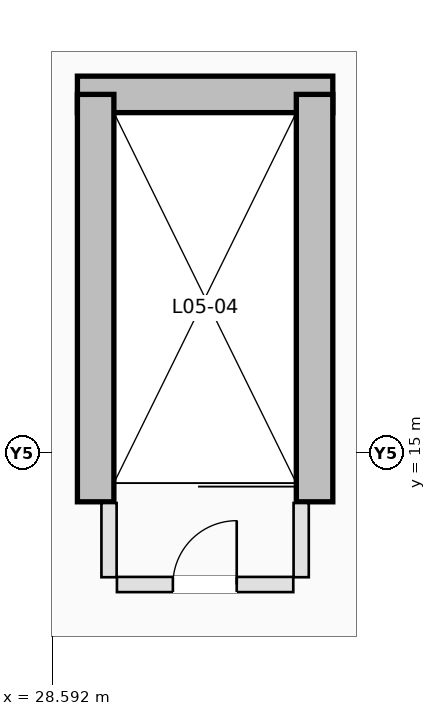
"""IFC4 building model, lengths in metres.
Left out: names, types, materials, properties, quantities, classifications, styles, units other than length and angle.
Written with IfcOpenShell. Run it as: python <this file> out.ifc"""

import sys

from ifc_helpers import new_model, si_unit, direction, frame, frame_2d, origin, place, context, subcontext, project, spatial, rectangle, extrude, element, fill, save


model = new_model("IFC4")
c1 = context("Model", 3, precision=1e-05, world=origin(), true_north=direction((0.0, 1.0)))
c2 = subcontext(c1, "Body", "Model", "MODEL_VIEW")
j1 = project(units=[si_unit("LENGTHUNIT", "METRE"), si_unit("PLANEANGLEUNIT", "RADIAN")], contexts=[c1])
p1 = place(None, origin())
s1 = spatial("IfcSite", under=j1, at=p1, CompositionType="ELEMENT")
p2 = place(p1, origin())
s2 = spatial("IfcBuilding", under=s1, at=p2, CompositionType="ELEMENT")
p3 = place(p2, frame((0.0, 0.0, 23.0)))
s3 = spatial("IfcBuildingStorey", under=s2, at=p3, CompositionType="ELEMENT", Elevation=23.0)
p4 = place(p3, frame((29.0, 20.9, 0.0), z_axis=(0.0, 0.0, 1.0), x_axis=(1.0, 0.0, 0.0)))
e1 = element("IfcWall", 1, at=p4, inside=s3, PredefinedType="SHEAR", context=c2, shape_type="SweptSolid", body=[
    extrude(rectangle(XDim=4.2, YDim=0.6, at=frame_2d((2.1, 0.0))), origin(), (0.0, 0.0, 1.0), 4.6),
])
for number, where, z_axis, x_axis in (
    (2, (29.3, 14.2, 0.0), (0.0, 0.0, 1.0), (0.0, 1.0, 0.0)),
    (3, (32.9, 14.2, 0.0), (0.0, 0.0, 1.0), (0.0, 1.0, 0.0)),
):
    element("IfcWall", number, at=place(p3, frame(where, z_axis=z_axis, x_axis=x_axis)), inside=s3, PredefinedType="SHEAR", context=c2, shape_type="SweptSolid", body=[
        extrude(rectangle(XDim=6.7, YDim=0.6, at=frame_2d((3.35, 0.0))), origin(), (0.0, 0.0, 1.0), 4.6),
    ])
p5 = place(p3, frame((29.65, 12.84, 0.0), z_axis=(0.0, 0.0, 1.0), x_axis=(1.0, 0.0, 0.0)))
e4 = element("IfcWall", 4, at=p5, inside=s3, PredefinedType="PARTITIONING", context=c2, shape_type="SweptSolid", body=[
    extrude(rectangle(XDim=2.9, YDim=0.25, at=frame_2d((1.45, 0.0))), origin(), (0.0, 0.0, 1.0), 4.35),
])
p6 = place(p5, frame((0.92, 0.0, 0.0)))
e5 = element("IfcOpeningElement", 5, at=p6, cuts=e4, PredefinedType="OPENING", context=c2, shape_type="SweptSolid", body=[
    extrude(rectangle(XDim=1.05, YDim=2.15, at=frame_2d((0.525, 1.075))), frame((0.0, 0.135, 0.0), z_axis=(0.0, -1.0, 0.0), x_axis=(1.0, 0.0, 0.0)), (0.0, 0.0, 1.0), 0.27),
])
for number, where, z_axis, x_axis in (
    (6, (29.52, 12.96, 0.0), (0.0, 0.0, 1.0), (0.0, 1.0, 0.0)),
    (7, (32.68, 12.96, 0.0), (0.0, 0.0, 1.0), (0.0, 1.0, 0.0)),
):
    element("IfcWall", number, at=place(p3, frame(where, z_axis=z_axis, x_axis=x_axis)), inside=s3, PredefinedType="PARTITIONING", context=c2, shape_type="SweptSolid", body=[
        extrude(rectangle(XDim=1.22, YDim=0.25, at=frame_2d((0.61, 0.0))), origin(), (0.0, 0.0, 1.0), 4.35),
    ])
p7 = place(p6, origin())
e8 = element("IfcDoor", 8, at=p7, inside=s3, OperationType="SINGLE_SWING_RIGHT", PredefinedType="DOOR", context=c2, shape_type="SweptSolid", body=[
    extrude(rectangle(XDim=1.05, YDim=2.15, at=frame_2d((0.525, 1.075))), frame((0.0, 0.025, 0.0), z_axis=(0.0, -1.0, 0.0), x_axis=(1.0, 0.0, 0.0)), (0.0, 0.0, 1.0), 0.05),
])
fill(e5, e8)
save(model, sys.argv[1])
